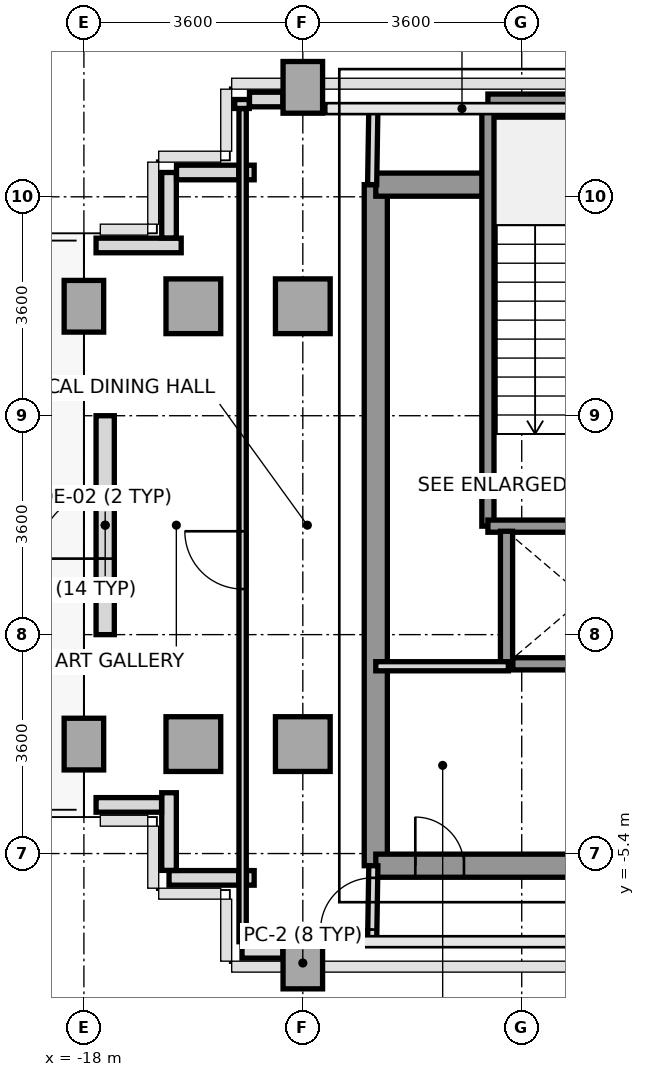
"""IFC4 building model, lengths in metres.
Left out: names, types, materials, properties, quantities, classifications, styles, units other than length and angle.
Written with IfcOpenShell. Run it as: python <this file> out.ifc"""

import sys

from ifc_helpers import new_model, si_unit, direction, frame, frame_2d, origin, origin_2d, place, context, subcontext, project, spatial, rectangle, extrude, source, transform, mapped, element, fill, save


model = new_model("IFC4")
c1 = context("Model", 3, precision=1e-05, world=origin(), true_north=direction((0.0, 1.0)))
c2 = subcontext(c1, "Body", "Model", "MODEL_VIEW")
j1 = project(units=[si_unit("LENGTHUNIT", "METRE"), si_unit("PLANEANGLEUNIT", "RADIAN")], contexts=[c1])
p1 = place(None, origin())
s1 = spatial("IfcSite", under=j1, at=p1, CompositionType="ELEMENT")
p2 = place(p1, origin())
s2 = spatial("IfcBuilding", under=s1, at=p2, CompositionType="ELEMENT")
p3 = place(p2, frame((0.0, 0.0, 156.2)))
s3 = spatial("IfcBuildingStorey", under=s2, at=p3, CompositionType="ELEMENT", Elevation=156.2)
m1 = source(origin(), c2, "Body", "SweptSolid", [
    extrude(rectangle(XDim=0.65, YDim=0.85, at=origin_2d()), origin(), (0.0, 0.0, 1.0), 4.0),
])
for number, where, z_axis, x_axis in (
    (1, (-18.0, -3.6, 0.0), (0.0, 0.0, 1.0), (1.0, 0.0, 0.0)),
    (2, (-18.0, 3.6, 0.0), (0.0, 0.0, 1.0), (1.0, 0.0, 0.0)),
):
    element("IfcColumn", number, at=place(p3, frame(where, z_axis=z_axis, x_axis=x_axis)), inside=s3, PredefinedType="COLUMN", context=c2, shape_type="MappedRepresentation", body=[
        mapped(m1, transform((0.0, 0.0, 0.0), x_axis=(1.0, 0.0, 0.0), y_axis=(0.0, 1.0, 0.0), z_axis=(0.0, 0.0, 1.0), scale=1.0)),
    ])
m2 = source(origin(), c2, "Body", "SweptSolid", [
    extrude(rectangle(XDim=0.9, YDim=0.9, at=origin_2d()), origin(), (0.0, 0.0, 1.0), 4.0),
])
for number, where, z_axis, x_axis in (
    (3, (-16.2, -3.6, 0.0), (0.0, 0.0, 1.0), (1.0, 0.0, 0.0)),
    (4, (-16.2, 3.6, 0.0), (0.0, 0.0, 1.0), (1.0, 0.0, 0.0)),
):
    element("IfcColumn", number, at=place(p3, frame(where, z_axis=z_axis, x_axis=x_axis)), inside=s3, PredefinedType="COLUMN", context=c2, shape_type="MappedRepresentation", body=[
        mapped(m2, transform((0.0, 0.0, 0.0), x_axis=(1.0, 0.0, 0.0), y_axis=(0.0, 1.0, 0.0), z_axis=(0.0, 0.0, 1.0), scale=1.0)),
    ])
p4 = place(p3, frame((-14.4, -7.2, 0.0), z_axis=(0.0, 0.0, 1.0), x_axis=(1.0, 0.0, 0.0)))
e5 = element("IfcColumn", 5, at=p4, inside=s3, PredefinedType="COLUMN", context=c2, shape_type="MappedRepresentation", body=[
    mapped(m1, transform((0.0, 0.0, 0.0), x_axis=(1.0, 0.0, 0.0), y_axis=(0.0, 1.0, 0.0), z_axis=(0.0, 0.0, 1.0), scale=1.0)),
])
for number, where, z_axis, x_axis in (
    (6, (-14.4, -3.6, 0.0), (0.0, 0.0, 1.0), (1.0, 0.0, 0.0)),
    (7, (-14.4, 3.6, 0.0), (0.0, 0.0, 1.0), (1.0, 0.0, 0.0)),
):
    element("IfcColumn", number, at=place(p3, frame(where, z_axis=z_axis, x_axis=x_axis)), inside=s3, PredefinedType="COLUMN", context=c2, shape_type="MappedRepresentation", body=[
        mapped(m2, transform((0.0, 0.0, 0.0), x_axis=(1.0, 0.0, 0.0), y_axis=(0.0, 1.0, 0.0), z_axis=(0.0, 0.0, 1.0), scale=1.0)),
    ])
p5 = place(p3, frame((-14.4, 7.2, 0.0), z_axis=(0.0, 0.0, 1.0), x_axis=(1.0, 0.0, 0.0)))
e8 = element("IfcColumn", 8, at=p5, inside=s3, PredefinedType="COLUMN", context=c2, shape_type="MappedRepresentation", body=[
    mapped(m1, transform((0.0, 0.0, 0.0), x_axis=(1.0, 0.0, 0.0), y_axis=(0.0, 1.0, 0.0), z_axis=(0.0, 0.0, 1.0), scale=1.0)),
])
p6 = place(p3, frame((-17.65, -1.8, 0.0), z_axis=(0.0, 0.0, 1.0), x_axis=(0.0, 1.0, 0.0)))
e9 = element("IfcWall", 9, at=p6, inside=s3, PredefinedType="SOLIDWALL", context=c2, shape_type="SweptSolid", body=[
    extrude(rectangle(XDim=3.6, YDim=0.3, at=frame_2d((1.8, 0.0))), origin(), (0.0, 0.0, 1.0), 3.35),
])
p7 = place(p6, frame((1.25, 0.0, 0.0)))
e10 = element("IfcOpeningElement", 10, at=p7, cuts=e9, PredefinedType="OPENING", context=c2, shape_type="SweptSolid", body=[
    extrude(rectangle(XDim=1.1, YDim=2.3, at=frame_2d((0.55, 1.15))), frame((0.0, 0.16, 0.0), z_axis=(0.0, -1.0, 0.0), x_axis=(1.0, 0.0, 0.0)), (0.0, 0.0, 1.0), 0.32),
])
p8 = place(p3, frame((-14.728, -7.0, 0.0), z_axis=(0.0, 0.0, 1.0), x_axis=(-1.0, 0.0, 0.0)))
e11 = element("IfcWall", 11, at=p8, inside=s3, PredefinedType="PARAPET", context=c2, shape_type="SweptSolid", body=[
    extrude(rectangle(XDim=0.672, YDim=0.24, at=frame_2d((0.336, 0.0))), origin(), (0.0, 0.0, 1.0), 1.15),
])
p9 = place(p3, frame((-15.2, -5.8, 0.0), z_axis=(0.0, 0.0, 1.0), x_axis=(-1.0, 0.0, 0.0)))
e12 = element("IfcWall", 12, at=p9, inside=s3, PredefinedType="PARAPET", context=c2, shape_type="SweptSolid", body=[
    extrude(rectangle(XDim=0.127, YDim=0.24, at=frame_2d((0.063, 0.0))), origin(), (0.0, 0.0, 1.0), 1.15),
])
p10 = place(p3, frame((-15.453, -5.8, 0.0), z_axis=(0.0, 0.0, 1.0), x_axis=(-1.0, 0.0, 0.0)))
e13 = element("IfcWall", 13, at=p10, inside=s3, PredefinedType="PARAPET", context=c2, shape_type="SweptSolid", body=[
    extrude(rectangle(XDim=1.147, YDim=0.24, at=frame_2d((0.574, 0.0))), origin(), (0.0, 0.0, 1.0), 1.15),
])
p11 = place(p3, frame((-16.6, -5.677, 0.0), z_axis=(0.0, 0.0, 1.0), x_axis=(0.0, 1.0, 0.0)))
e14 = element("IfcWall", 14, at=p11, inside=s3, PredefinedType="PARAPET", context=c2, shape_type="SweptSolid", body=[
    extrude(rectangle(XDim=1.277, YDim=0.24, at=frame_2d((0.639, 0.0))), origin(), (0.0, 0.0, 1.0), 1.15),
])
p12 = place(p3, frame((-16.723, -4.6, 0.0), z_axis=(0.0, 0.0, 1.0), x_axis=(-1.0, 0.0, 0.0)))
e15 = element("IfcWall", 15, at=p12, inside=s3, PredefinedType="PARAPET", context=c2, shape_type="SweptSolid", body=[
    extrude(rectangle(XDim=1.077, YDim=0.24, at=frame_2d((0.539, 0.0))), origin(), (0.0, 0.0, 1.0), 1.15),
])
p13 = place(p3, frame((-17.8, 4.6, 0.0), z_axis=(0.0, 0.0, 1.0), x_axis=(1.0, 0.0, 0.0)))
e16 = element("IfcWall", 16, at=p13, inside=s3, PredefinedType="PARAPET", context=c2, shape_type="SweptSolid", body=[
    extrude(rectangle(XDim=1.4, YDim=0.24, at=frame_2d((0.7, 0.0))), origin(), (0.0, 0.0, 1.0), 1.15),
])
p14 = place(p3, frame((-16.6, 4.723, 0.0), z_axis=(0.0, 0.0, 1.0), x_axis=(0.0, 1.0, 0.0)))
e17 = element("IfcWall", 17, at=p14, inside=s3, PredefinedType="PARAPET", context=c2, shape_type="SweptSolid", body=[
    extrude(rectangle(XDim=1.077, YDim=0.24, at=frame_2d((0.539, 0.0))), origin(), (0.0, 0.0, 1.0), 1.15),
])
p15 = place(p3, frame((-16.477, 5.8, 0.0), z_axis=(0.0, 0.0, 1.0), x_axis=(1.0, 0.0, 0.0)))
e18 = element("IfcWall", 18, at=p15, inside=s3, PredefinedType="PARAPET", context=c2, shape_type="SweptSolid", body=[
    extrude(rectangle(XDim=1.024, YDim=0.24, at=frame_2d((0.512, 0.0))), origin(), (0.0, 0.0, 1.0), 1.15),
])
p16 = place(p3, frame((-15.327, 5.8, 0.0), z_axis=(0.0, 0.0, 1.0), x_axis=(1.0, 0.0, 0.0)))
e19 = element("IfcWall", 19, at=p16, inside=s3, PredefinedType="PARAPET", context=c2, shape_type="SweptSolid", body=[
    extrude(rectangle(XDim=0.127, YDim=0.24, at=frame_2d((0.063, 0.0))), origin(), (0.0, 0.0, 1.0), 1.15),
])
p17 = place(p3, frame((-15.4, 6.853, 0.0), z_axis=(0.0, 0.0, 1.0), x_axis=(0.0, 1.0, 0.0)))
e20 = element("IfcWall", 20, at=p17, inside=s3, PredefinedType="PARAPET", context=c2, shape_type="SweptSolid", body=[
    extrude(rectangle(XDim=0.147, YDim=0.24, at=frame_2d((0.073, 0.0))), origin(), (0.0, 0.0, 1.0), 1.15),
])
p18 = place(p3, frame((-15.277, 7.0, 0.0), z_axis=(0.0, 0.0, 1.0), x_axis=(1.0, 0.0, 0.0)))
e21 = element("IfcWall", 21, at=p18, inside=s3, PredefinedType="PARAPET", context=c2, shape_type="SweptSolid", body=[
    extrude(rectangle(XDim=0.549, YDim=0.24, at=frame_2d((0.274, 0.0))), origin(), (0.0, 0.0, 1.0), 1.15),
])
p19 = place(p3, frame((-13.2, -5.6, 0.0), z_axis=(0.0, 0.0, 1.0), x_axis=(0.0, 1.0, 0.0)))
e22 = element("IfcWall", 22, at=p19, inside=s3, PredefinedType="SHEAR", context=c2, shape_type="SweptSolid", body=[
    extrude(rectangle(XDim=11.2, YDim=0.38, at=frame_2d((5.6, 0.0))), origin(), (0.0, 0.0, 1.0), 4.0),
])
p20 = place(p3, frame((-11.356, 6.9, 0.0), z_axis=(0.0, 0.0, 1.0), x_axis=(1.0, 0.0, 0.0)))
e23 = element("IfcWall", 23, at=p20, inside=s3, PredefinedType="SHEAR", context=c2, shape_type="SweptSolid", body=[
    extrude(rectangle(XDim=5.956, YDim=0.38, at=frame_2d((2.978, 0.0))), origin(), (0.0, 0.0, 1.0), 4.0),
])
p21 = place(p3, frame((-13.2, 5.6, 0.0), z_axis=(0.0, 0.0, 1.0), x_axis=(1.0, 0.0, 0.0)))
e24 = element("IfcWall", 24, at=p21, inside=s3, PredefinedType="SHEAR", context=c2, shape_type="SweptSolid", body=[
    extrude(rectangle(XDim=1.844, YDim=0.38, at=frame_2d((0.922, 0.0))), origin(), (0.0, 0.0, 1.0), 4.0),
])
p22 = place(p3, frame((-13.2, -5.6, 0.0), z_axis=(0.0, 0.0, 1.0), x_axis=(1.0, 0.0, 0.0)))
e25 = element("IfcWall", 25, at=p22, inside=s3, PredefinedType="SHEAR", context=c2, shape_type="SweptSolid", body=[
    extrude(rectangle(XDim=7.8, YDim=0.38, at=frame_2d((3.9, 0.0))), origin(), (0.0, 0.0, 1.0), 4.0),
])
p23 = place(p22, frame((3.6, 0.0, 0.0)))
e26 = element("IfcOpeningElement", 26, at=p23, cuts=e25, PredefinedType="OPENING", context=c2, shape_type="SweptSolid", body=[
    extrude(rectangle(XDim=1.2, YDim=2.2, at=frame_2d((0.6, 1.1))), frame((0.0, 0.2, 0.0), z_axis=(0.0, -1.0, 0.0), x_axis=(1.0, 0.0, 0.0)), (0.0, 0.0, 1.0), 0.4),
])
p24 = place(p22, frame((0.65, 0.0, 0.0)))
e27 = element("IfcOpeningElement", 27, at=p24, cuts=e25, PredefinedType="OPENING", context=c2, shape_type="SweptSolid", body=[
    extrude(rectangle(XDim=0.8, YDim=2.1, at=frame_2d((0.4, 1.05))), frame((0.0, 0.2, 0.0), z_axis=(0.0, -1.0, 0.0), x_axis=(1.0, 0.0, 0.0)), (0.0, 0.0, 1.0), 0.4),
])
p25 = place(p3, frame((-11.356, -0.016, 0.0), z_axis=(0.0, 0.0, 1.0), x_axis=(0.0, 1.0, 0.0)))
e28 = element("IfcWall", 28, at=p25, inside=s3, PredefinedType="SOLIDWALL", context=c2, shape_type="SweptSolid", body=[
    extrude(rectangle(XDim=6.916, YDim=0.2, at=frame_2d((3.458, 0.0))), origin(), (0.0, 0.0, 1.0), 4.0),
])
p26 = place(p3, frame((-11.356, -0.016, 0.0), z_axis=(0.0, 0.0, 1.0), x_axis=(1.0, 0.0, 0.0)))
e29 = element("IfcWall", 29, at=p26, inside=s3, PredefinedType="SOLIDWALL", context=c2, shape_type="SweptSolid", body=[
    extrude(rectangle(XDim=3.152, YDim=0.2, at=frame_2d((1.576, 0.0))), origin(), (0.0, 0.0, 1.0), 4.0),
])
p27 = place(p3, frame((-11.05, -2.28, 0.0), z_axis=(0.0, 0.0, 1.0), x_axis=(0.0, 1.0, 0.0)))
e30 = element("IfcWall", 30, at=p27, inside=s3, PredefinedType="SOLIDWALL", context=c2, shape_type="SweptSolid", body=[
    extrude(rectangle(XDim=2.18, YDim=0.2, at=frame_2d((1.09, 0.0))), origin(), (0.0, 0.0, 1.0), 4.0),
])
p28 = place(p3, frame((-10.946, -2.28, 0.0), z_axis=(0.0, 0.0, 1.0), x_axis=(1.0, 0.0, 0.0)))
e31 = element("IfcWall", 31, at=p28, inside=s3, PredefinedType="SOLIDWALL", context=c2, shape_type="SweptSolid", body=[
    extrude(rectangle(XDim=2.362, YDim=0.2, at=frame_2d((1.181, 0.0))), origin(), (0.0, 0.0, 1.0), 4.0),
])
p29 = place(p3, frame((-13.2, -2.32, 0.0), z_axis=(0.0, 0.0, 1.0), x_axis=(1.0, 0.0, 0.0)))
e32 = element("IfcWall", 32, at=p29, inside=s3, PredefinedType="PARTITIONING", context=c2, shape_type="SweptSolid", body=[
    extrude(rectangle(XDim=2.18, YDim=0.15, at=frame_2d((1.09, 0.0))), origin(), (0.0, 0.0, 1.0), 4.0),
])
p30 = place(p3, frame((-13.26, 5.6, 0.0), z_axis=(0.0, 0.0, 1.0), x_axis=(0.016013571389, 0.999871774545, 0.0)))
e33 = element("IfcWall", 33, at=p30, inside=s3, PredefinedType="PARTITIONING", context=c2, shape_type="SweptSolid", body=[
    extrude(rectangle(XDim=1.25, YDim=0.15, at=frame_2d((0.625, 0.0))), origin(), (0.0, 0.0, 1.0), 4.0),
])
p31 = place(p3, frame((-13.26, -6.85, 0.0), z_axis=(0.0, 0.0, 1.0), x_axis=(0.016013571389, 0.999871774545, 0.0)))
e34 = element("IfcWall", 34, at=p31, inside=s3, PredefinedType="PARTITIONING", context=c2, shape_type="SweptSolid", body=[
    extrude(rectangle(XDim=1.25, YDim=0.15, at=frame_2d((0.625, 0.0))), origin(), (0.0, 0.0, 1.0), 4.0),
])
p32 = place(p31, frame((0.2, 0.0, 0.0)))
e35 = element("IfcOpeningElement", 35, at=p32, cuts=e34, PredefinedType="OPENING", context=c2, shape_type="SweptSolid", body=[
    extrude(rectangle(XDim=0.85, YDim=2.1, at=frame_2d((0.425, 1.05))), frame((0.0, 0.085, 0.0), z_axis=(0.0, -1.0, 0.0), x_axis=(1.0, 0.0, 0.0)), (0.0, 0.0, 1.0), 0.17),
])
p33 = place(p3, frame((-15.39, -6.85, 0.0), z_axis=(0.0, 0.0, 1.0), x_axis=(0.0, 1.0, 0.0)))
e36 = element("IfcWall", 36, at=p33, inside=s3, PredefinedType="PARTITIONING", context=c2, shape_type="SweptSolid", body=[
    extrude(rectangle(XDim=13.7, YDim=0.12, at=frame_2d((6.85, 0.0))), origin(), (0.0, 0.0, 1.0), 4.0),
])
p34 = place(p33, frame((5.8, 0.0, 0.0)))
e37 = element("IfcOpeningElement", 37, at=p34, cuts=e36, PredefinedType="OPENING", context=c2, shape_type="SweptSolid", body=[
    extrude(rectangle(XDim=0.95, YDim=2.15, at=frame_2d((0.475, 1.075))), frame((0.0, 0.07, 0.0), z_axis=(0.0, -1.0, 0.0), x_axis=(1.0, 0.0, 0.0)), (0.0, 0.0, 1.0), 0.14),
])
m3 = source(origin(), c2, "Body", "SweptSolid", [
    extrude(rectangle(XDim=1.1, YDim=2.3, at=frame_2d((0.55, 1.15))), frame((0.0, 0.025, 0.0), z_axis=(0.0, -1.0, 0.0), x_axis=(1.0, 0.0, 0.0)), (0.0, 0.0, 1.0), 0.05),
])
p35 = place(p7, origin())
e38 = element("IfcDoor", 38, at=p35, inside=s3, OperationType="SINGLE_SWING_LEFT", PredefinedType="DOOR", context=c2, shape_type="MappedRepresentation", body=[
    mapped(m3, transform((0.0, 0.0, 0.0), x_axis=(1.0, 0.0, 0.0), y_axis=(0.0, 1.0, 0.0), z_axis=(0.0, 0.0, 1.0), scale=1.0)),
])
fill(e10, e38)
m4 = source(origin(), c2, "Body", "SweptSolid", [
    extrude(rectangle(XDim=0.8, YDim=2.1, at=frame_2d((0.4, 1.05))), frame((0.0, 0.025, 0.0), z_axis=(0.0, -1.0, 0.0), x_axis=(1.0, 0.0, 0.0)), (0.0, 0.0, 1.0), 0.05),
])
p36 = place(p24, origin())
e39 = element("IfcDoor", 39, at=p36, inside=s3, OperationType="SINGLE_SWING_LEFT", PredefinedType="DOOR", context=c2, shape_type="MappedRepresentation", body=[
    mapped(m4, transform((0.0, 0.0, 0.0), x_axis=(1.0, 0.0, 0.0), y_axis=(0.0, 1.0, 0.0), z_axis=(0.0, 0.0, 1.0), scale=1.0)),
])
fill(e27, e39)
m5 = source(origin(), c2, "Body", "SweptSolid", [
    extrude(rectangle(XDim=0.85, YDim=2.1, at=frame_2d((0.425, 1.05))), frame((0.0, 0.025, 0.0), z_axis=(0.0, -1.0, 0.0), x_axis=(1.0, 0.0, 0.0)), (0.0, 0.0, 1.0), 0.05),
])
p37 = place(p32, origin())
e40 = element("IfcDoor", 40, at=p37, inside=s3, OperationType="SINGLE_SWING_LEFT", PredefinedType="DOOR", context=c2, shape_type="MappedRepresentation", body=[
    mapped(m5, transform((0.0, 0.0, 0.0), x_axis=(1.0, 0.0, 0.0), y_axis=(0.0, 1.0, 0.0), z_axis=(0.0, 0.0, 1.0), scale=1.0)),
])
fill(e35, e40)
m6 = source(origin(), c2, "Body", "SweptSolid", [
    extrude(rectangle(XDim=0.95, YDim=2.15, at=frame_2d((0.475, 1.075))), frame((0.0, 0.025, 0.0), z_axis=(0.0, -1.0, 0.0), x_axis=(1.0, 0.0, 0.0)), (0.0, 0.0, 1.0), 0.05),
])
p38 = place(p34, origin())
e41 = element("IfcDoor", 41, at=p38, inside=s3, OperationType="SINGLE_SWING_RIGHT", PredefinedType="DOOR", context=c2, shape_type="MappedRepresentation", body=[
    mapped(m6, transform((0.0, 0.0, 0.0), x_axis=(1.0, 0.0, 0.0), y_axis=(0.0, 1.0, 0.0), z_axis=(0.0, 0.0, 1.0), scale=1.0)),
])
fill(e37, e41)
save(model, sys.argv[1])
